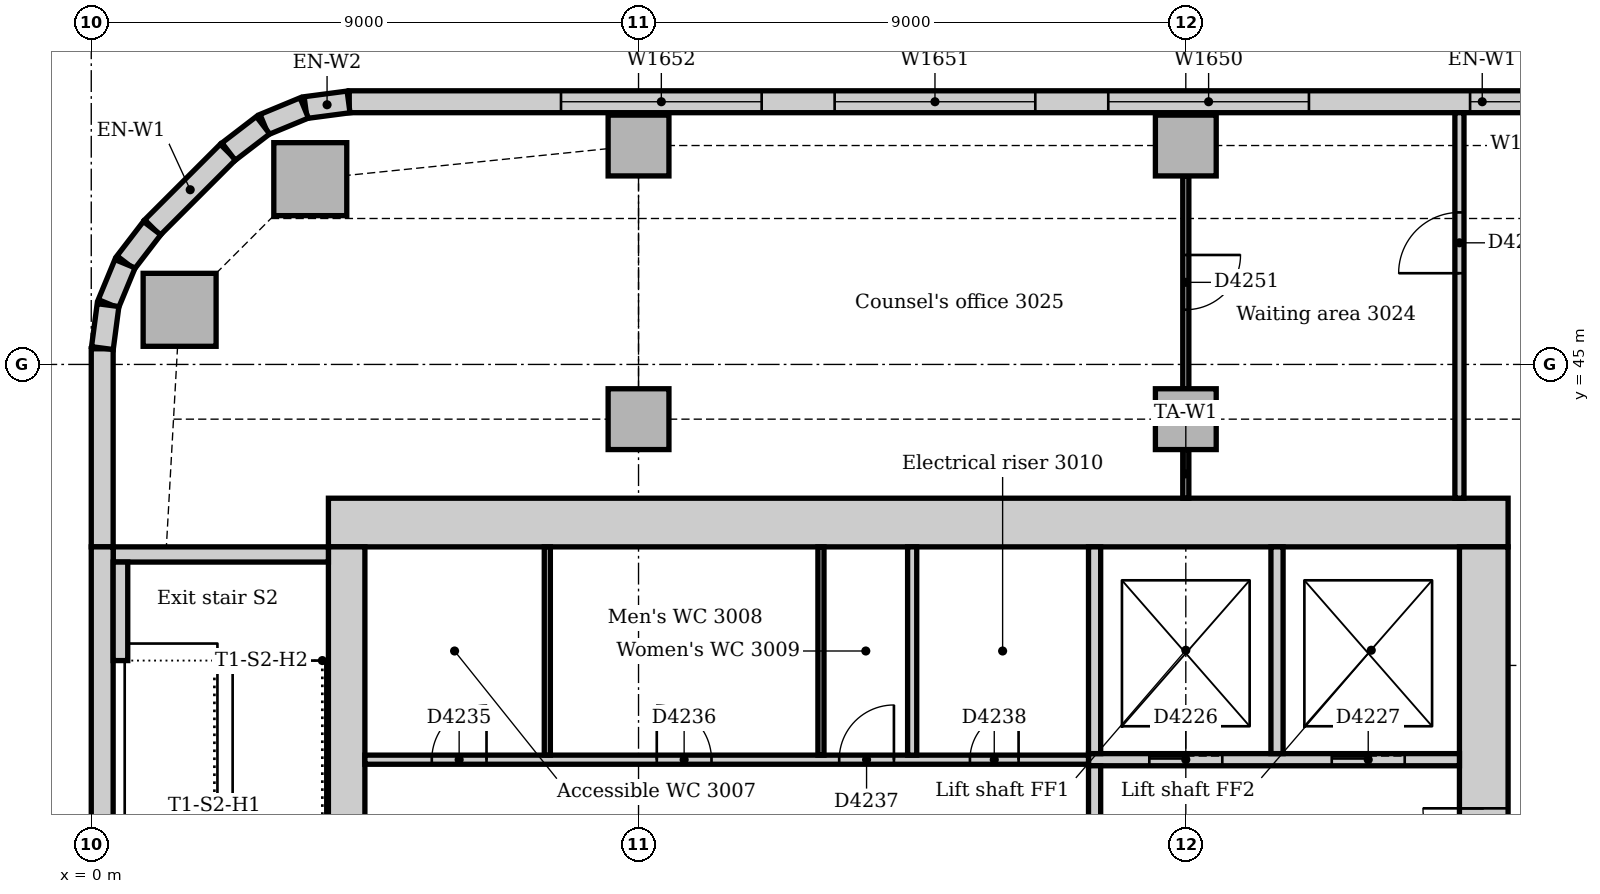
"""IFC4 building model, lengths in metres.
Left out: names, types, materials, properties, quantities, classifications, styles, units other than length and angle.
Written with IfcOpenShell. Run it as: python <this file> out.ifc"""

import sys

from ifc_helpers import new_model, si_unit, direction, frame, frame_2d, origin, origin_2d, place, context, subcontext, project, spatial, rectangle, extrude, element, fill, save


model = new_model("IFC4")
c1 = context("Model", 3, precision=1e-05, world=origin(), true_north=direction((0.0, 1.0)))
c2 = subcontext(c1, "Body", "Model", "MODEL_VIEW")
j1 = project(units=[si_unit("LENGTHUNIT", "METRE"), si_unit("PLANEANGLEUNIT", "RADIAN")], contexts=[c1])
p1 = place(None, origin())
s1 = spatial("IfcSite", under=j1, at=p1, CompositionType="ELEMENT")
p2 = place(p1, origin())
s2 = spatial("IfcBuilding", under=s1, at=p2, CompositionType="ELEMENT")
p3 = place(p2, frame((0.0, 0.0, 128.0)))
s3 = spatial("IfcBuildingStorey", under=s2, at=p3, CompositionType="ELEMENT", Elevation=128.0)
p4 = place(p3, frame((23.3, 42.4, 0.0), z_axis=(0.0, 0.0, 1.0), x_axis=(-1.0, 0.0, 0.0)))
e1 = element("IfcWall", 1, at=p4, inside=s3, PredefinedType="SOLIDWALL", context=c2, shape_type="SweptSolid", body=[
    extrude(rectangle(XDim=19.4, YDim=0.8, at=frame_2d((9.7, 0.0))), origin(), (0.0, 0.0, 1.0), 4.0),
])
p5 = place(p3, frame((22.9, 31.5, 0.0), z_axis=(0.0, 0.0, 1.0), x_axis=(0.0, 1.0, 0.0)))
e2 = element("IfcWall", 2, at=p5, inside=s3, PredefinedType="SOLIDWALL", context=c2, shape_type="SweptSolid", body=[
    extrude(rectangle(XDim=10.5, YDim=0.8, at=frame_2d((5.25, 0.0))), origin(), (0.0, 0.0, 1.0), 4.0),
])
p6 = place(p5, frame((3.15, 0.0, 0.0)))
e3 = element("IfcOpeningElement", 3, at=p6, cuts=e2, PredefinedType="OPENING", context=c2, shape_type="SweptSolid", body=[
    extrude(rectangle(XDim=1.0, YDim=2.1, at=frame_2d((0.5, 1.05))), frame((0.0, 0.41, 0.0), z_axis=(0.0, -1.0, 0.0), x_axis=(1.0, 0.0, 0.0)), (0.0, 0.0, 1.0), 0.82),
])
p7 = place(p5, frame((5.2, 0.0, 0.0)))
e4 = element("IfcOpeningElement", 4, at=p7, cuts=e2, PredefinedType="OPENING", context=c2, shape_type="SweptSolid", body=[
    extrude(rectangle(XDim=1.0, YDim=2.1, at=frame_2d((0.5, 1.05))), frame((0.0, 0.41, 0.0), z_axis=(0.0, -1.0, 0.0), x_axis=(1.0, 0.0, 0.0)), (0.0, 0.0, 1.0), 0.82),
])
p8 = place(p3, frame((4.2, 42.0, 0.0), z_axis=(0.0, 0.0, 1.0), x_axis=(0.0, -1.0, 0.0)))
e5 = element("IfcWall", 5, at=p8, inside=s3, PredefinedType="SOLIDWALL", context=c2, shape_type="SweptSolid", body=[
    extrude(rectangle(XDim=10.5, YDim=0.6, at=frame_2d((5.25, 0.0))), origin(), (0.0, 0.0, 1.0), 4.0),
])
p9 = place(p8, frame((5.3, 0.0, 0.0)))
e6 = element("IfcOpeningElement", 6, at=p9, cuts=e5, PredefinedType="OPENING", context=c2, shape_type="SweptSolid", body=[
    extrude(rectangle(XDim=1.0, YDim=2.1, at=frame_2d((0.5, 1.05))), frame((0.0, 0.31, 0.0), z_axis=(0.0, -1.0, 0.0), x_axis=(1.0, 0.0, 0.0)), (0.0, 0.0, 1.0), 0.62),
])
p10 = place(p3, frame((3.9, 41.875, 0.0), z_axis=(0.0, 0.0, 1.0), x_axis=(-1.0, 0.0, 0.0)))
e7 = element("IfcWall", 7, at=p10, inside=s3, PredefinedType="SOLIDWALL", context=c2, shape_type="SweptSolid", body=[
    extrude(rectangle(XDim=3.54, YDim=0.25, at=frame_2d((1.77, 0.0))), origin(), (0.0, 0.0, 1.0), 4.0),
])
for number, where, z_axis, x_axis in (
    (8, (3.602, 48.047, 0.0), (0.0, 0.0, 1.0), (1.0, 0.0, 0.0)),
    (9, (1.453, 45.898, 0.0), (0.0, 0.0, 1.0), (1.0, 0.0, 0.0)),
):
    element("IfcColumn", number, at=place(p3, frame(where, z_axis=z_axis, x_axis=x_axis)), inside=s3, PredefinedType="COLUMN", context=c2, shape_type="SweptSolid", body=[
        extrude(rectangle(XDim=1.2, YDim=1.2, at=origin_2d()), origin(), (0.0, 0.0, 1.0), 3.85),
    ])
for number, where, z_axis, x_axis in (
    (10, (9.0, 48.6, 0.0), (0.0, 0.0, 1.0), (1.0, 0.0, 0.0)),
    (11, (18.0, 48.6, 0.0), (0.0, 0.0, 1.0), (1.0, 0.0, 0.0)),
    (12, (9.0, 44.1, 0.0), (0.0, 0.0, 1.0), (1.0, 0.0, 0.0)),
    (13, (18.0, 44.1, 0.0), (0.0, 0.0, 1.0), (1.0, 0.0, 0.0)),
):
    element("IfcColumn", number, at=place(p3, frame(where, z_axis=z_axis, x_axis=x_axis)), inside=s3, PredefinedType="COLUMN", context=c2, shape_type="SweptSolid", body=[
        extrude(rectangle(XDim=1.0, YDim=1.0, at=origin_2d()), origin(), (0.0, 0.0, 1.0), 3.85),
    ])
p11 = place(p3, frame((41.507, 49.32, 0.0), z_axis=(0.0, 0.0, 1.0), x_axis=(-1.0, 0.0, 0.0)))
e14 = element("IfcWall", 14, at=p11, inside=s3, PredefinedType="STANDARD", context=c2, shape_type="SweptSolid", body=[
    extrude(rectangle(XDim=37.265, YDim=0.36, at=frame_2d((18.632, 0.0))), origin(), (0.0, 0.0, 1.0), 3.85),
])
p12 = place(p11, frame((3.482, 0.0, 0.9)))
e15 = element("IfcOpeningElement", 15, at=p12, cuts=e14, PredefinedType="OPENING", context=c2, shape_type="SweptSolid", body=[
    extrude(rectangle(XDim=3.3, YDim=1.6, at=frame_2d((1.65, 0.8))), frame((0.0, 0.19, 0.0), z_axis=(0.0, -1.0, 0.0), x_axis=(1.0, 0.0, 0.0)), (0.0, 0.0, 1.0), 0.38),
])
p13 = place(p11, frame((7.982, 0.0, 0.9)))
e16 = element("IfcOpeningElement", 16, at=p13, cuts=e14, PredefinedType="OPENING", context=c2, shape_type="SweptSolid", body=[
    extrude(rectangle(XDim=3.3, YDim=1.6, at=frame_2d((1.65, 0.8))), frame((0.0, 0.19, 0.0), z_axis=(0.0, -1.0, 0.0), x_axis=(1.0, 0.0, 0.0)), (0.0, 0.0, 1.0), 0.38),
])
p14 = place(p11, frame((12.482, 0.0, 0.9)))
e17 = element("IfcOpeningElement", 17, at=p14, cuts=e14, PredefinedType="OPENING", context=c2, shape_type="SweptSolid", body=[
    extrude(rectangle(XDim=3.3, YDim=1.6, at=frame_2d((1.65, 0.8))), frame((0.0, 0.19, 0.0), z_axis=(0.0, -1.0, 0.0), x_axis=(1.0, 0.0, 0.0)), (0.0, 0.0, 1.0), 0.38),
])
p15 = place(p11, frame((17.032, 0.0, 0.9)))
e18 = element("IfcOpeningElement", 18, at=p15, cuts=e14, PredefinedType="OPENING", context=c2, shape_type="SweptSolid", body=[
    extrude(rectangle(XDim=1.8, YDim=1.6, at=frame_2d((0.9, 0.8))), frame((0.0, 0.19, 0.0), z_axis=(0.0, -1.0, 0.0), x_axis=(1.0, 0.0, 0.0)), (0.0, 0.0, 1.0), 0.38),
])
p16 = place(p11, frame((21.482, 0.0, 0.9)))
e19 = element("IfcOpeningElement", 19, at=p16, cuts=e14, PredefinedType="OPENING", context=c2, shape_type="SweptSolid", body=[
    extrude(rectangle(XDim=3.3, YDim=1.6, at=frame_2d((1.65, 0.8))), frame((0.0, 0.19, 0.0), z_axis=(0.0, -1.0, 0.0), x_axis=(1.0, 0.0, 0.0)), (0.0, 0.0, 1.0), 0.38),
])
p17 = place(p11, frame((25.982, 0.0, 0.9)))
e20 = element("IfcOpeningElement", 20, at=p17, cuts=e14, PredefinedType="OPENING", context=c2, shape_type="SweptSolid", body=[
    extrude(rectangle(XDim=3.3, YDim=1.6, at=frame_2d((1.65, 0.8))), frame((0.0, 0.19, 0.0), z_axis=(0.0, -1.0, 0.0), x_axis=(1.0, 0.0, 0.0)), (0.0, 0.0, 1.0), 0.38),
])
p18 = place(p11, frame((30.482, 0.0, 0.9)))
e21 = element("IfcOpeningElement", 21, at=p18, cuts=e14, PredefinedType="OPENING", context=c2, shape_type="SweptSolid", body=[
    extrude(rectangle(XDim=3.3, YDim=1.6, at=frame_2d((1.65, 0.8))), frame((0.0, 0.19, 0.0), z_axis=(0.0, -1.0, 0.0), x_axis=(1.0, 0.0, 0.0)), (0.0, 0.0, 1.0), 0.38),
])
p19 = place(p3, frame((2.249, 48.494, 0.0), z_axis=(0.0, 0.0, 1.0), x_axis=(-0.707106781187, -0.707106781187, 0.0)))
e22 = element("IfcWall", 22, at=p19, inside=s3, PredefinedType="STANDARD", context=c2, shape_type="SweptSolid", body=[
    extrude(rectangle(XDim=1.757, YDim=0.36, at=frame_2d((0.879, 0.0))), origin(), (0.0, 0.0, 1.0), 3.85),
])
p20 = place(p3, frame((0.18, 45.257, 0.0), z_axis=(0.0, 0.0, 1.0), x_axis=(0.0, -1.0, 0.0)))
e23 = element("IfcWall", 23, at=p20, inside=s3, PredefinedType="STANDARD", context=c2, shape_type="SweptSolid", body=[
    extrude(rectangle(XDim=3.257, YDim=0.36, at=frame_2d((1.629, 0.0))), origin(), (0.0, 0.0, 1.0), 3.85),
])
p21 = place(p3, frame((0.18, 42.0, 0.0), z_axis=(0.0, 0.0, 1.0), x_axis=(0.0, -1.0, 0.0)))
e24 = element("IfcWall", 24, at=p21, inside=s3, PredefinedType="STANDARD", context=c2, shape_type="SweptSolid", body=[
    extrude(rectangle(XDim=6.75, YDim=0.36, at=frame_2d((3.375, 0.0))), origin(), (0.0, 0.0, 1.0), 3.85),
])
for number, where, z_axis, x_axis in (
    (25, (4.231, 49.317, 0.0), (0.0, 0.0, 1.0), (-0.991, -0.131, 0.0)),
    (26, (3.503, 49.218, 0.0), (0.0, 0.0, 1.0), (-0.924, -0.383, 0.0)),
):
    element("IfcWall", number, at=place(p3, frame(where, z_axis=z_axis, x_axis=x_axis)), inside=s3, PredefinedType="STANDARD", context=c2, shape_type="SweptSolid", body=[
        extrude(rectangle(XDim=0.713, YDim=0.36, at=frame_2d((0.356, 0.0))), origin(), (0.0, 0.0, 1.0), 3.85),
    ])
for number, where, z_axis, x_axis in (
    (27, (2.825, 48.934, 0.0), (0.0, 0.0, 1.0), (-0.793, -0.609, 0.0)),
    (28, (1.0, 47.241, 0.0), (0.0, 0.0, 1.0), (-0.609, -0.793, 0.0)),
):
    element("IfcWall", number, at=place(p3, frame(where, z_axis=z_axis, x_axis=x_axis)), inside=s3, PredefinedType="STANDARD", context=c2, shape_type="SweptSolid", body=[
        extrude(rectangle(XDim=0.713, YDim=0.36, at=frame_2d((0.357, 0.0))), origin(), (0.0, 0.0, 1.0), 3.85),
    ])
for number, where, z_axis, x_axis in (
    (29, (0.555, 46.656, 0.0), (0.0, 0.0, 1.0), (-0.383, -0.924, 0.0)),
    (30, (0.276, 45.976, 0.0), (0.0, 0.0, 1.0), (-0.131, -0.991, 0.0)),
):
    element("IfcWall", number, at=place(p3, frame(where, z_axis=z_axis, x_axis=x_axis)), inside=s3, PredefinedType="STANDARD", context=c2, shape_type="SweptSolid", body=[
        extrude(rectangle(XDim=0.713, YDim=0.36, at=frame_2d((0.356, 0.0))), origin(), (0.0, 0.0, 1.0), 3.85),
    ])
p22 = place(p3, frame((0.48, 40.13, 0.0), z_axis=(0.0, 0.0, 1.0), x_axis=(0.0, 1.0, 0.0)))
e31 = element("IfcWall", 31, at=p22, inside=s3, PredefinedType="STANDARD", context=c2, shape_type="SweptSolid", body=[
    extrude(rectangle(XDim=1.62, YDim=0.24, at=frame_2d((0.81, 0.0))), origin(), (0.0, 0.0, 1.0), 4.0),
])
p23 = place(p3, frame((16.4, 38.5, 0.0), z_axis=(0.0, 0.0, 1.0), x_axis=(1.0, 0.0, 0.0)))
e32 = element("IfcWall", 32, at=p23, inside=s3, PredefinedType="PARTITIONING", context=c2, shape_type="SweptSolid", body=[
    extrude(rectangle(XDim=6.1, YDim=0.2, at=frame_2d((3.05, 0.0))), origin(), (0.0, 0.0, 1.0), 3.85),
])
p24 = place(p23, frame((1.0, 0.0, 0.0)))
e33 = element("IfcOpeningElement", 33, at=p24, cuts=e32, PredefinedType="OPENING", context=c2, shape_type="SweptSolid", body=[
    extrude(rectangle(XDim=1.2, YDim=2.1, at=frame_2d((0.6, 1.05))), frame((0.0, 0.11, 0.0), z_axis=(0.0, -1.0, 0.0), x_axis=(1.0, 0.0, 0.0)), (0.0, 0.0, 1.0), 0.22),
])
p25 = place(p23, frame((4.0, 0.0, 0.0)))
e34 = element("IfcOpeningElement", 34, at=p25, cuts=e32, PredefinedType="OPENING", context=c2, shape_type="SweptSolid", body=[
    extrude(rectangle(XDim=1.2, YDim=2.1, at=frame_2d((0.6, 1.05))), frame((0.0, 0.11, 0.0), z_axis=(0.0, -1.0, 0.0), x_axis=(1.0, 0.0, 0.0)), (0.0, 0.0, 1.0), 0.22),
])
p26 = place(p3, frame((16.5, 35.85, 0.0), z_axis=(0.0, 0.0, 1.0), x_axis=(0.0, 1.0, 0.0)))
e35 = element("IfcWall", 35, at=p26, inside=s3, PredefinedType="PARTITIONING", context=c2, shape_type="SweptSolid", body=[
    extrude(rectangle(XDim=2.55, YDim=0.2, at=frame_2d((1.275, 0.0))), origin(), (0.0, 0.0, 1.0), 3.85),
])
for number, where, z_axis, x_axis in (
    (36, (16.5, 38.6, 0.0), (0.0, 0.0, 1.0), (0.0, 1.0, 0.0)),
    (37, (19.5, 38.6, 0.0), (0.0, 0.0, 1.0), (0.0, 1.0, 0.0)),
):
    element("IfcWall", number, at=place(p3, frame(where, z_axis=z_axis, x_axis=x_axis)), inside=s3, PredefinedType="PARTITIONING", context=c2, shape_type="SweptSolid", body=[
        extrude(rectangle(XDim=3.4, YDim=0.2, at=frame_2d((1.7, 0.0))), origin(), (0.0, 0.0, 1.0), 3.85),
    ])
p27 = place(p3, frame((4.5, 38.5, 0.0), z_axis=(0.0, 0.0, 1.0), x_axis=(1.0, 0.0, 0.0)))
e38 = element("IfcWall", 38, at=p27, inside=s3, PredefinedType="PARTITIONING", context=c2, shape_type="SweptSolid", body=[
    extrude(rectangle(XDim=11.9, YDim=0.15, at=frame_2d((5.95, 0.0))), origin(), (0.0, 0.0, 1.0), 3.85),
])
p28 = place(p27, frame((1.1, 0.0, 0.0)))
e39 = element("IfcOpeningElement", 39, at=p28, cuts=e38, PredefinedType="OPENING", context=c2, shape_type="SweptSolid", body=[
    extrude(rectangle(XDim=0.9, YDim=2.1, at=frame_2d((0.45, 1.05))), frame((0.0, 0.085, 0.0), z_axis=(0.0, -1.0, 0.0), x_axis=(1.0, 0.0, 0.0)), (0.0, 0.0, 1.0), 0.17),
])
p29 = place(p27, frame((4.8, 0.0, 0.0)))
e40 = element("IfcOpeningElement", 40, at=p29, cuts=e38, PredefinedType="OPENING", context=c2, shape_type="SweptSolid", body=[
    extrude(rectangle(XDim=0.9, YDim=2.1, at=frame_2d((0.45, 1.05))), frame((0.0, 0.085, 0.0), z_axis=(0.0, -1.0, 0.0), x_axis=(1.0, 0.0, 0.0)), (0.0, 0.0, 1.0), 0.17),
])
p30 = place(p27, frame((7.8, 0.0, 0.0)))
e41 = element("IfcOpeningElement", 41, at=p30, cuts=e38, PredefinedType="OPENING", context=c2, shape_type="SweptSolid", body=[
    extrude(rectangle(XDim=0.9, YDim=2.1, at=frame_2d((0.45, 1.05))), frame((0.0, 0.085, 0.0), z_axis=(0.0, -1.0, 0.0), x_axis=(1.0, 0.0, 0.0)), (0.0, 0.0, 1.0), 0.17),
])
p31 = place(p27, frame((9.95, 0.0, 0.0)))
e42 = element("IfcOpeningElement", 42, at=p31, cuts=e38, PredefinedType="OPENING", context=c2, shape_type="SweptSolid", body=[
    extrude(rectangle(XDim=0.8, YDim=2.1, at=frame_2d((0.4, 1.05))), frame((0.0, 0.085, 0.0), z_axis=(0.0, -1.0, 0.0), x_axis=(1.0, 0.0, 0.0)), (0.0, 0.0, 1.0), 0.17),
])
p32 = place(p3, frame((22.5, 42.8, 0.0), z_axis=(0.0, 0.0, 1.0), x_axis=(0.0, 1.0, 0.0)))
e43 = element("IfcWall", 43, at=p32, inside=s3, PredefinedType="PARTITIONING", context=c2, shape_type="SweptSolid", body=[
    extrude(rectangle(XDim=6.34, YDim=0.15, at=frame_2d((3.17, 0.0))), origin(), (0.0, 0.0, 1.0), 3.85),
])
p33 = place(p32, frame((3.7, 0.0, 0.0)))
e44 = element("IfcOpeningElement", 44, at=p33, cuts=e43, PredefinedType="OPENING", context=c2, shape_type="SweptSolid", body=[
    extrude(rectangle(XDim=1.0, YDim=2.1, at=frame_2d((0.5, 1.05))), frame((0.0, 0.085, 0.0), z_axis=(0.0, -1.0, 0.0), x_axis=(1.0, 0.0, 0.0)), (0.0, 0.0, 1.0), 0.17),
])
p34 = place(p3, frame((13.5, 38.575, 0.0), z_axis=(0.0, 0.0, 1.0), x_axis=(0.0, 1.0, 0.0)))
e45 = element("IfcWall", 45, at=p34, inside=s3, PredefinedType="PARTITIONING", context=c2, shape_type="SweptSolid", body=[
    extrude(rectangle(XDim=3.425, YDim=0.15, at=frame_2d((1.712, 0.0))), origin(), (0.0, 0.0, 1.0), 3.85),
])
p35 = place(p3, frame((18.0, 42.8, 0.0), z_axis=(0.0, 0.0, 1.0), x_axis=(0.0, 1.0, 0.0)))
e46 = element("IfcWall", 46, at=p35, inside=s3, PredefinedType="PARTITIONING", context=c2, shape_type="SweptSolid", body=[
    extrude(rectangle(XDim=0.8, YDim=0.1, at=frame_2d((0.4, 0.0))), origin(), (0.0, 0.0, 1.0), 3.85),
])
p36 = place(p3, frame((18.0, 44.6, 0.0), z_axis=(0.0, 0.0, 1.0), x_axis=(0.0, 1.0, 0.0)))
e47 = element("IfcWall", 47, at=p36, inside=s3, PredefinedType="PARTITIONING", context=c2, shape_type="SweptSolid", body=[
    extrude(rectangle(XDim=3.5, YDim=0.1, at=frame_2d((1.75, 0.0))), origin(), (0.0, 0.0, 1.0), 3.652),
])
p37 = place(p36, frame((1.3, 0.0, 0.0)))
e48 = element("IfcOpeningElement", 48, at=p37, cuts=e47, PredefinedType="OPENING", context=c2, shape_type="SweptSolid", body=[
    extrude(rectangle(XDim=0.9, YDim=2.1, at=frame_2d((0.45, 1.05))), frame((0.0, 0.06, 0.0), z_axis=(0.0, -1.0, 0.0), x_axis=(1.0, 0.0, 0.0)), (0.0, 0.0, 1.0), 0.12),
])
for number, where, z_axis, x_axis in (
    (49, (7.5, 38.575, 0.0), (0.0, 0.0, 1.0), (0.0, 1.0, 0.0)),
    (50, (12.0, 38.575, 0.0), (0.0, 0.0, 1.0), (0.0, 1.0, 0.0)),
):
    element("IfcWall", number, at=place(p3, frame(where, z_axis=z_axis, x_axis=x_axis)), inside=s3, PredefinedType="PARTITIONING", context=c2, shape_type="SweptSolid", body=[
        extrude(rectangle(XDim=3.425, YDim=0.1, at=frame_2d((1.712, 0.0))), origin(), (0.0, 0.0, 1.0), 3.85),
    ])
p38 = place(p15, origin())
e51 = element("IfcWindow", 51, at=p38, inside=s3, PartitioningType="SINGLE_PANEL", PredefinedType="WINDOW", context=c2, shape_type="SweptSolid", body=[
    extrude(rectangle(XDim=1.8, YDim=1.6, at=frame_2d((0.9, 0.8))), frame((0.0, 0.13, 0.0), z_axis=(0.0, -1.0, 0.0), x_axis=(1.0, 0.0, 0.0)), (0.0, 0.0, 1.0), 0.06),
])
fill(e18, e51)
p39 = place(p16, origin())
e52 = element("IfcWindow", 52, at=p39, inside=s3, PartitioningType="SINGLE_PANEL", PredefinedType="WINDOW", context=c2, shape_type="SweptSolid", body=[
    extrude(rectangle(XDim=3.3, YDim=1.6, at=frame_2d((1.65, 0.8))), frame((0.0, 0.13, 0.0), z_axis=(0.0, -1.0, 0.0), x_axis=(1.0, 0.0, 0.0)), (0.0, 0.0, 1.0), 0.06),
])
fill(e19, e52)
p40 = place(p17, origin())
e53 = element("IfcWindow", 53, at=p40, inside=s3, PartitioningType="SINGLE_PANEL", PredefinedType="WINDOW", context=c2, shape_type="SweptSolid", body=[
    extrude(rectangle(XDim=3.3, YDim=1.6, at=frame_2d((1.65, 0.8))), frame((0.0, 0.13, 0.0), z_axis=(0.0, -1.0, 0.0), x_axis=(1.0, 0.0, 0.0)), (0.0, 0.0, 1.0), 0.06),
])
fill(e20, e53)
p41 = place(p18, origin())
e54 = element("IfcWindow", 54, at=p41, inside=s3, PartitioningType="SINGLE_PANEL", PredefinedType="WINDOW", context=c2, shape_type="SweptSolid", body=[
    extrude(rectangle(XDim=3.3, YDim=1.6, at=frame_2d((1.65, 0.8))), frame((0.0, 0.13, 0.0), z_axis=(0.0, -1.0, 0.0), x_axis=(1.0, 0.0, 0.0)), (0.0, 0.0, 1.0), 0.06),
])
fill(e21, e54)
p42 = place(p24, origin())
e55 = element("IfcDoor", 55, at=p42, inside=s3, OperationType="SLIDING_TO_LEFT", PredefinedType="DOOR", context=c2, shape_type="SweptSolid", body=[
    extrude(rectangle(XDim=1.2, YDim=2.1, at=frame_2d((0.6, 1.05))), frame((0.0, 0.025, 0.0), z_axis=(0.0, -1.0, 0.0), x_axis=(1.0, 0.0, 0.0)), (0.0, 0.0, 1.0), 0.05),
])
fill(e33, e55)
p43 = place(p25, origin())
e56 = element("IfcDoor", 56, at=p43, inside=s3, OperationType="SLIDING_TO_LEFT", PredefinedType="DOOR", context=c2, shape_type="SweptSolid", body=[
    extrude(rectangle(XDim=1.2, YDim=2.1, at=frame_2d((0.6, 1.05))), frame((0.0, 0.025, 0.0), z_axis=(0.0, -1.0, 0.0), x_axis=(1.0, 0.0, 0.0)), (0.0, 0.0, 1.0), 0.05),
])
fill(e34, e56)
p44 = place(p7, origin())
e57 = element("IfcDoor", 57, at=p44, inside=s3, OperationType="SINGLE_SWING_RIGHT", PredefinedType="DOOR", context=c2, shape_type="SweptSolid", body=[
    extrude(rectangle(XDim=1.0, YDim=2.1, at=frame_2d((0.5, 1.05))), frame((0.0, 0.025, 0.0), z_axis=(0.0, -1.0, 0.0), x_axis=(1.0, 0.0, 0.0)), (0.0, 0.0, 1.0), 0.05),
])
fill(e4, e57)
p45 = place(p28, origin())
e58 = element("IfcDoor", 58, at=p45, inside=s3, OperationType="SINGLE_SWING_RIGHT", PredefinedType="DOOR", context=c2, shape_type="SweptSolid", body=[
    extrude(rectangle(XDim=0.9, YDim=2.1, at=frame_2d((0.45, 1.05))), frame((0.0, 0.025, 0.0), z_axis=(0.0, -1.0, 0.0), x_axis=(1.0, 0.0, 0.0)), (0.0, 0.0, 1.0), 0.05),
])
fill(e39, e58)
p46 = place(p29, origin())
e59 = element("IfcDoor", 59, at=p46, inside=s3, OperationType="SINGLE_SWING_LEFT", PredefinedType="DOOR", context=c2, shape_type="SweptSolid", body=[
    extrude(rectangle(XDim=0.9, YDim=2.1, at=frame_2d((0.45, 1.05))), frame((0.0, 0.025, 0.0), z_axis=(0.0, -1.0, 0.0), x_axis=(1.0, 0.0, 0.0)), (0.0, 0.0, 1.0), 0.05),
])
fill(e40, e59)
p47 = place(p30, origin())
e60 = element("IfcDoor", 60, at=p47, inside=s3, OperationType="SINGLE_SWING_RIGHT", PredefinedType="DOOR", context=c2, shape_type="SweptSolid", body=[
    extrude(rectangle(XDim=0.9, YDim=2.1, at=frame_2d((0.45, 1.05))), frame((0.0, 0.025, 0.0), z_axis=(0.0, -1.0, 0.0), x_axis=(1.0, 0.0, 0.0)), (0.0, 0.0, 1.0), 0.05),
])
fill(e41, e60)
p48 = place(p31, origin())
e61 = element("IfcDoor", 61, at=p48, inside=s3, OperationType="SINGLE_SWING_RIGHT", PredefinedType="DOOR", context=c2, shape_type="SweptSolid", body=[
    extrude(rectangle(XDim=0.8, YDim=2.1, at=frame_2d((0.4, 1.05))), frame((0.0, 0.025, 0.0), z_axis=(0.0, -1.0, 0.0), x_axis=(1.0, 0.0, 0.0)), (0.0, 0.0, 1.0), 0.05),
])
fill(e42, e61)
p49 = place(p33, origin())
e62 = element("IfcDoor", 62, at=p49, inside=s3, OperationType="SINGLE_SWING_LEFT", PredefinedType="DOOR", context=c2, shape_type="SweptSolid", body=[
    extrude(rectangle(XDim=1.0, YDim=2.1, at=frame_2d((0.5, 1.05))), frame((0.0, 0.025, 0.0), z_axis=(0.0, -1.0, 0.0), x_axis=(1.0, 0.0, 0.0)), (0.0, 0.0, 1.0), 0.05),
])
fill(e44, e62)
p50 = place(p37, frame((0.9, 0.0, 0.0), z_axis=(0.0, 0.0, 1.0), x_axis=(-1.0, 0.0, 0.0)))
e63 = element("IfcDoor", 63, at=p50, inside=s3, OperationType="SINGLE_SWING_LEFT", PredefinedType="DOOR", context=c2, shape_type="SweptSolid", body=[
    extrude(rectangle(XDim=0.9, YDim=2.1, at=frame_2d((0.45, 1.05))), frame((0.0, 0.025, 0.0), z_axis=(0.0, -1.0, 0.0), x_axis=(1.0, 0.0, 0.0)), (0.0, 0.0, 1.0), 0.05),
])
fill(e48, e63)
save(model, sys.argv[1])
